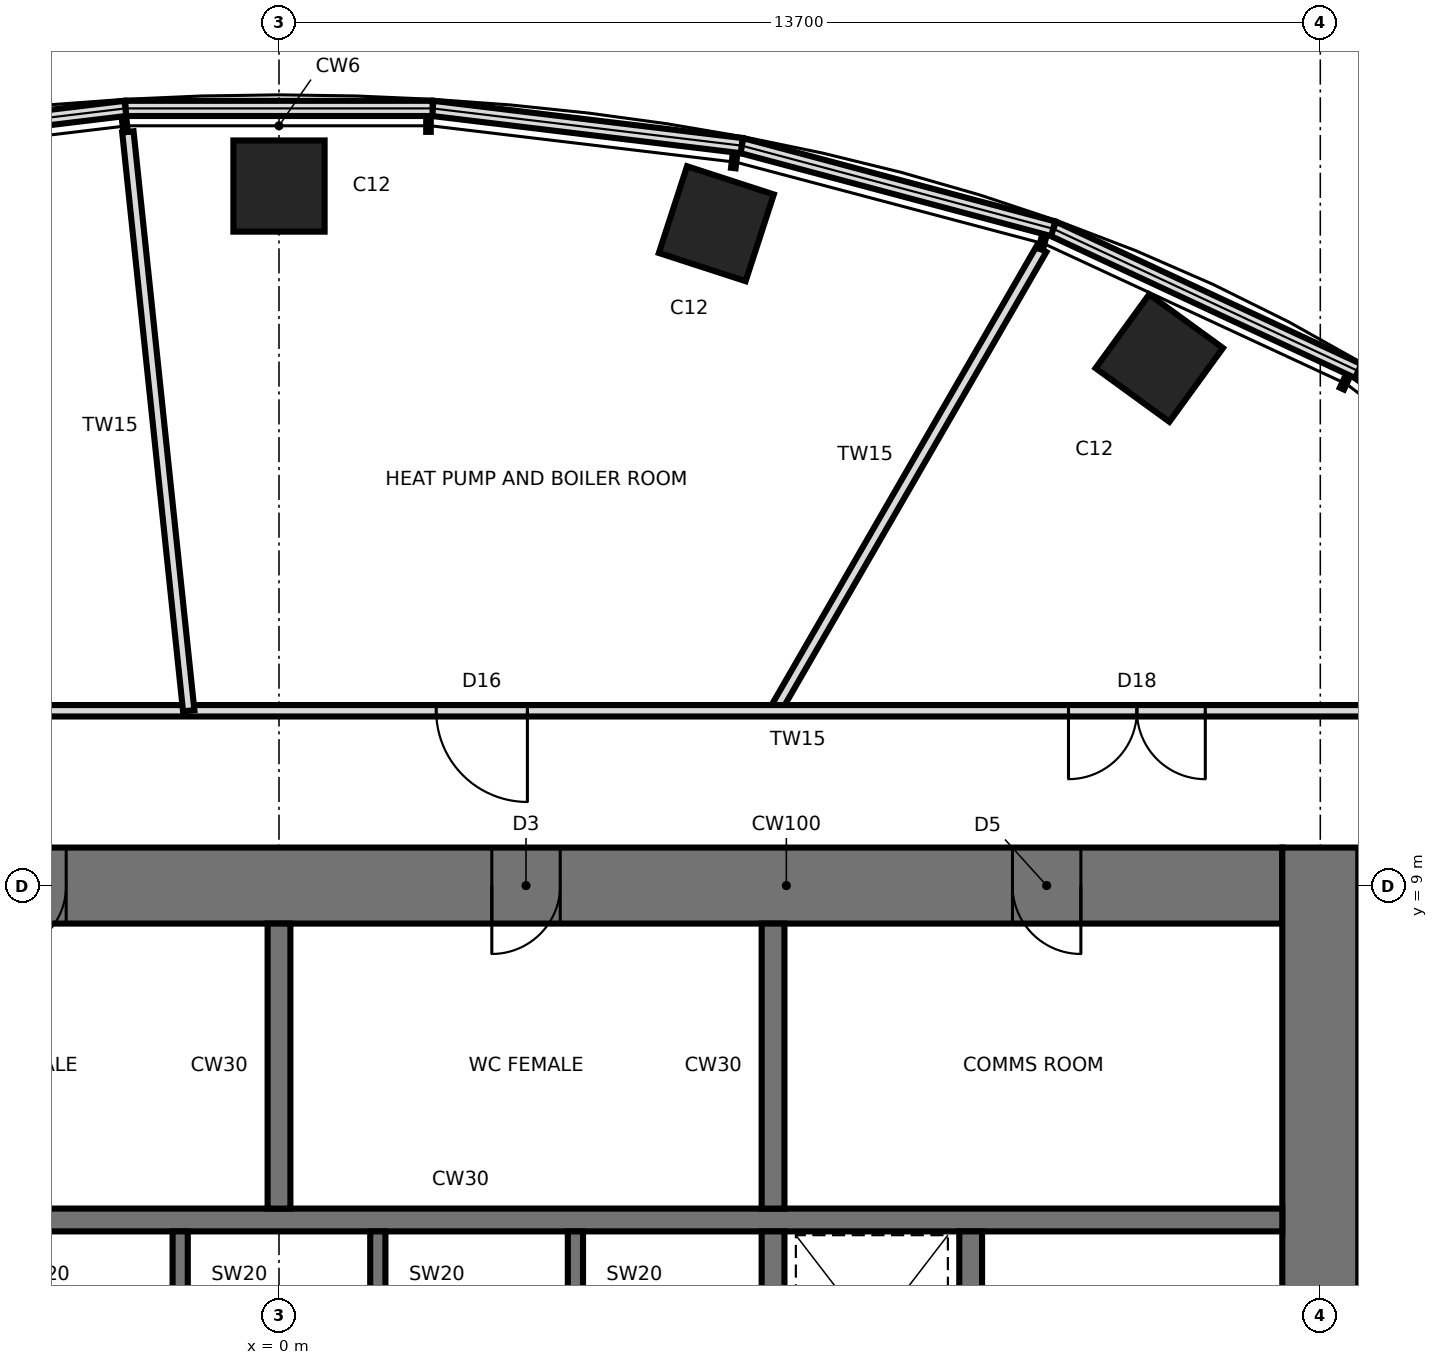
"""IFC4 building model, lengths in metres.
Left out: names, types, materials, properties, quantities, classifications, styles, units other than length and angle.
Written with IfcOpenShell. Run it as: python <this file> out.ifc"""

import sys

from ifc_helpers import new_model, si_unit, direction, frame, frame_2d, origin, origin_2d, place, context, subcontext, project, spatial, rectangle, extrude, element, fill, save


model = new_model("IFC4")
c1 = context("Model", 3, precision=1e-05, world=origin(), true_north=direction((0.0, 1.0)))
c2 = subcontext(c1, "Body", "Model", "MODEL_VIEW")
j1 = project(units=[si_unit("LENGTHUNIT", "METRE"), si_unit("PLANEANGLEUNIT", "RADIAN")], contexts=[c1])
p1 = place(None, origin())
s1 = spatial("IfcSite", under=j1, at=p1, CompositionType="ELEMENT")
p2 = place(p1, origin())
s2 = spatial("IfcBuilding", under=s1, at=p2, CompositionType="ELEMENT")
p3 = place(p2, frame((0.0, 0.0, 277.0)))
s3 = spatial("IfcBuildingStorey", under=s2, at=p3, CompositionType="ELEMENT", Elevation=277.0)
for number, where, z_axis, x_axis in (
    (1, (11.581, 15.94, 0.0), (0.0, 0.0, 1.0), (0.588, 0.809, 0.0)),
    (2, (5.754, 17.708, 0.0), (0.0, 0.0, 1.0), (0.309, 0.951, 0.0)),
    (3, (0.0, 18.204, 0.0), (0.0, 0.0, 1.0), (0.0, 1.0, 0.0)),
):
    element("IfcColumn", number, at=place(p3, frame(where, z_axis=z_axis, x_axis=x_axis)), inside=s3, PredefinedType="COLUMN", context=c2, shape_type="SweptSolid", body=[
        extrude(rectangle(XDim=1.2, YDim=1.2, at=origin_2d()), origin(), (0.0, 0.0, 1.0), 5.0),
    ])
p4 = place(p3, frame((13.2, 9.0, 0.0), z_axis=(0.0, 0.0, 1.0), x_axis=(-1.0, 0.0, 0.0)))
e4 = element("IfcWall", 4, at=p4, inside=s3, PredefinedType="SHEAR", context=c2, shape_type="SweptSolid", body=[
    extrude(rectangle(XDim=26.4, YDim=1.0, at=frame_2d((13.2, 0.0))), origin(), (0.0, 0.0, 1.0), 5.0),
])
p5 = place(p4, frame((2.65, 0.0, 0.0)))
e5 = element("IfcOpeningElement", 5, at=p5, cuts=e4, PredefinedType="OPENING", context=c2, shape_type="SweptSolid", body=[
    extrude(rectangle(XDim=0.9, YDim=2.1, at=frame_2d((0.45, 1.05))), frame((0.0, 0.51, 0.0), z_axis=(0.0, -1.0, 0.0), x_axis=(1.0, 0.0, 0.0)), (0.0, 0.0, 1.0), 1.02),
])
p6 = place(p4, frame((9.5, 0.0, 0.0)))
e6 = element("IfcOpeningElement", 6, at=p6, cuts=e4, PredefinedType="OPENING", context=c2, shape_type="SweptSolid", body=[
    extrude(rectangle(XDim=0.9, YDim=2.1, at=frame_2d((0.45, 1.05))), frame((0.0, 0.51, 0.0), z_axis=(0.0, -1.0, 0.0), x_axis=(1.0, 0.0, 0.0)), (0.0, 0.0, 1.0), 1.02),
])
p7 = place(p4, frame((16.0, 0.0, 0.0)))
e7 = element("IfcOpeningElement", 7, at=p7, cuts=e4, PredefinedType="OPENING", context=c2, shape_type="SweptSolid", body=[
    extrude(rectangle(XDim=0.9, YDim=2.1, at=frame_2d((0.45, 1.05))), frame((0.0, 0.51, 0.0), z_axis=(0.0, -1.0, 0.0), x_axis=(1.0, 0.0, 0.0)), (0.0, 0.0, 1.0), 1.02),
])
p8 = place(p4, frame((21.25, 0.0, 0.0)))
e8 = element("IfcOpeningElement", 8, at=p8, cuts=e4, PredefinedType="OPENING", context=c2, shape_type="SweptSolid", body=[
    extrude(rectangle(XDim=0.9, YDim=2.1, at=frame_2d((0.45, 1.05))), frame((0.0, 0.51, 0.0), z_axis=(0.0, -1.0, 0.0), x_axis=(1.0, 0.0, 0.0)), (0.0, 0.0, 1.0), 1.02),
])
p9 = place(p4, frame((24.8, 0.0, 0.0)))
e9 = element("IfcOpeningElement", 9, at=p9, cuts=e4, PredefinedType="OPENING", context=c2, shape_type="SweptSolid", body=[
    extrude(rectangle(XDim=1.0, YDim=2.1, at=frame_2d((0.5, 1.05))), frame((0.0, 0.51, 0.0), z_axis=(0.0, -1.0, 0.0), x_axis=(1.0, 0.0, 0.0)), (0.0, 0.0, 1.0), 1.02),
])
p10 = place(p3, frame((13.7, -9.5, 0.0), z_axis=(0.0, 0.0, 1.0), x_axis=(0.0, 1.0, 0.0)))
e10 = element("IfcWall", 10, at=p10, inside=s3, PredefinedType="SHEAR", context=c2, shape_type="SweptSolid", body=[
    extrude(rectangle(XDim=19.0, YDim=1.0, at=frame_2d((9.5, 0.0))), origin(), (0.0, 0.0, 1.0), 5.0),
])
p11 = place(p10, frame((8.6, 0.0, 0.0)))
e11 = element("IfcOpeningElement", 11, at=p11, cuts=e10, PredefinedType="OPENING", context=c2, shape_type="SweptSolid", body=[
    extrude(rectangle(XDim=1.8, YDim=2.4, at=frame_2d((0.9, 1.2))), frame((0.0, 0.51, 0.0), z_axis=(0.0, -1.0, 0.0), x_axis=(1.0, 0.0, 0.0)), (0.0, 0.0, 1.0), 1.02),
])
p12 = place(p3, frame((-13.2, 4.6, 0.0), z_axis=(0.0, 0.0, 1.0), x_axis=(1.0, 0.0, 0.0)))
e12 = element("IfcWall", 12, at=p12, inside=s3, PredefinedType="SHEAR", context=c2, shape_type="SweptSolid", body=[
    extrude(rectangle(XDim=26.4, YDim=0.3, at=frame_2d((13.2, 0.0))), origin(), (0.0, 0.0, 1.0), 5.0),
])
p13 = place(p3, frame((6.5, 1.75, 0.0), z_axis=(0.0, 0.0, 1.0), x_axis=(0.0, 1.0, 0.0)))
e13 = element("IfcWall", 13, at=p13, inside=s3, PredefinedType="SHEAR", context=c2, shape_type="SweptSolid", body=[
    extrude(rectangle(XDim=2.7, YDim=0.3, at=frame_2d((1.35, 0.0))), origin(), (0.0, 0.0, 1.0), 5.0),
])
p14 = place(p3, frame((6.5, 4.75, 0.0), z_axis=(0.0, 0.0, 1.0), x_axis=(0.0, 1.0, 0.0)))
e14 = element("IfcWall", 14, at=p14, inside=s3, PredefinedType="SHEAR", context=c2, shape_type="SweptSolid", body=[
    extrude(rectangle(XDim=3.75, YDim=0.3, at=frame_2d((1.875, 0.0))), origin(), (0.0, 0.0, 1.0), 5.0),
])
for number, where, z_axis, x_axis in (
    (15, (-1.3, 1.75, 0.0), (0.0, 0.0, 1.0), (0.0, 1.0, 0.0)),
    (16, (1.3, 1.75, 0.0), (0.0, 0.0, 1.0), (0.0, 1.0, 0.0)),
    (17, (3.9, 1.75, 0.0), (0.0, 0.0, 1.0), (0.0, 1.0, 0.0)),
):
    element("IfcWall", number, at=place(p3, frame(where, z_axis=z_axis, x_axis=x_axis)), inside=s3, PredefinedType="SHEAR", context=c2, shape_type="SweptSolid", body=[
        extrude(rectangle(XDim=2.7, YDim=0.2, at=frame_2d((1.35, 0.0))), origin(), (0.0, 0.0, 1.0), 5.0),
    ])
p15 = place(p3, frame((0.0, 4.75, 0.0), z_axis=(0.0, 0.0, 1.0), x_axis=(0.0, 1.0, 0.0)))
e18 = element("IfcWall", 18, at=p15, inside=s3, PredefinedType="SHEAR", context=c2, shape_type="SweptSolid", body=[
    extrude(rectangle(XDim=3.75, YDim=0.3, at=frame_2d((1.875, 0.0))), origin(), (0.0, 0.0, 1.0), 5.0),
])
p16 = place(p3, frame((9.1, 1.75, 0.0), z_axis=(0.0, 0.0, 1.0), x_axis=(0.0, 1.0, 0.0)))
e19 = element("IfcWall", 19, at=p16, inside=s3, PredefinedType="SHEAR", context=c2, shape_type="SweptSolid", body=[
    extrude(rectangle(XDim=2.7, YDim=0.3, at=frame_2d((1.35, 0.0))), origin(), (0.0, 0.0, 1.0), 5.0),
])
p17 = place(p3, frame((17.859, 12.976, 5.0), z_axis=(0.0, 0.0, 1.0), x_axis=(-0.794855686591, 0.606798514743, 0.0)))
e20 = element("IfcWall", 20, at=p17, inside=s3, PredefinedType="PARAPET", context=c2, shape_type="SweptSolid", body=[
    extrude(rectangle(XDim=4.605, YDim=0.2, at=frame_2d((2.302, 0.0))), origin(), (0.0, 0.0, 1.0), 0.4),
])
p18 = place(p3, frame((14.199, 15.77, 5.0), z_axis=(0.0, 0.0, 1.0), x_axis=(-0.906246502857, 0.422749661217, 0.0)))
e21 = element("IfcWall", 21, at=p18, inside=s3, PredefinedType="PARAPET", context=c2, shape_type="SweptSolid", body=[
    extrude(rectangle(XDim=4.429, YDim=0.2, at=frame_2d((2.214, 0.0))), origin(), (0.0, 0.0, 1.0), 0.4),
])
p19 = place(p3, frame((10.186, 17.642, 5.0), z_axis=(0.0, 0.0, 1.0), x_axis=(-0.96617759257, 0.257877605881, 0.0)))
e22 = element("IfcWall", 22, at=p19, inside=s3, PredefinedType="PARAPET", context=c2, shape_type="SweptSolid", body=[
    extrude(rectangle(XDim=4.241, YDim=0.2, at=frame_2d((2.121, 0.0))), origin(), (0.0, 0.0, 1.0), 0.4),
])
p20 = place(p3, frame((6.088, 18.736, 5.0), z_axis=(0.0, 0.0, 1.0), x_axis=(-0.99282711648, 0.119558842338, 0.0)))
e23 = element("IfcWall", 23, at=p20, inside=s3, PredefinedType="PARAPET", context=c2, shape_type="SweptSolid", body=[
    extrude(rectangle(XDim=4.096, YDim=0.2, at=frame_2d((2.048, 0.0))), origin(), (0.0, 0.0, 1.0), 0.4),
])
p21 = place(p3, frame((2.021, 19.226, 5.0), z_axis=(0.0, 0.0, 1.0), x_axis=(-1.0, 0.0, 0.0)))
e24 = element("IfcWall", 24, at=p21, inside=s3, PredefinedType="PARAPET", context=c2, shape_type="SweptSolid", body=[
    extrude(rectangle(XDim=4.042, YDim=0.2, at=frame_2d((2.021, 0.0))), origin(), (0.0, 0.0, 1.0), 0.4),
])
p22 = place(p3, frame((-2.021, 19.226, 5.0), z_axis=(0.0, 0.0, 1.0), x_axis=(-0.99282711648, -0.119558842338, 0.0)))
e25 = element("IfcWall", 25, at=p22, inside=s3, PredefinedType="PARAPET", context=c2, shape_type="SweptSolid", body=[
    extrude(rectangle(XDim=4.096, YDim=0.2, at=frame_2d((2.048, 0.0))), origin(), (0.0, 0.0, 1.0), 0.4),
])
p23 = place(p3, frame((6.524, 11.3, 0.0), z_axis=(0.0, 0.0, 1.0), x_axis=(0.4999806097, 0.86603659849, 0.0)))
e26 = element("IfcWall", 26, at=p23, inside=s3, PredefinedType="PARTITIONING", context=c2, shape_type="SweptSolid", body=[
    extrude(rectangle(XDim=7.013, YDim=0.15, at=frame_2d((3.506, 0.0))), origin(), (0.0, 0.0, 1.0), 4.75),
])
p24 = place(p3, frame((16.0, 11.3, 0.0), z_axis=(0.0, 0.0, 1.0), x_axis=(-1.0, 0.0, 0.0)))
e27 = element("IfcWall", 27, at=p24, inside=s3, PredefinedType="PARTITIONING", context=c2, shape_type="SweptSolid", body=[
    extrude(rectangle(XDim=32.0, YDim=0.15, at=frame_2d((16.0, 0.0))), origin(), (0.0, 0.0, 1.0), 4.75),
])
p25 = place(p24, frame((3.813, 0.0, 0.0)))
e28 = element("IfcOpeningElement", 28, at=p25, cuts=e27, PredefinedType="OPENING", context=c2, shape_type="SweptSolid", body=[
    extrude(rectangle(XDim=1.8, YDim=2.4, at=frame_2d((0.9, 1.2))), frame((0.0, 0.085, 0.0), z_axis=(0.0, -1.0, 0.0), x_axis=(1.0, 0.0, 0.0)), (0.0, 0.0, 1.0), 0.17),
])
p26 = place(p24, frame((12.732, 0.0, 0.0)))
e29 = element("IfcOpeningElement", 29, at=p26, cuts=e27, PredefinedType="OPENING", context=c2, shape_type="SweptSolid", body=[
    extrude(rectangle(XDim=1.2, YDim=2.1, at=frame_2d((0.6, 1.05))), frame((0.0, 0.085, 0.0), z_axis=(0.0, -1.0, 0.0), x_axis=(1.0, 0.0, 0.0)), (0.0, 0.0, 1.0), 0.17),
])
p27 = place(p24, frame((20.806, 0.0, 0.0)))
e30 = element("IfcOpeningElement", 30, at=p27, cuts=e27, PredefinedType="OPENING", context=c2, shape_type="SweptSolid", body=[
    extrude(rectangle(XDim=1.8, YDim=2.4, at=frame_2d((0.9, 1.2))), frame((0.0, 0.085, 0.0), z_axis=(0.0, -1.0, 0.0), x_axis=(1.0, 0.0, 0.0)), (0.0, 0.0, 1.0), 0.17),
])
p28 = place(p24, frame((28.487, 0.0, 0.0)))
e31 = element("IfcOpeningElement", 31, at=p28, cuts=e27, PredefinedType="OPENING", context=c2, shape_type="SweptSolid", body=[
    extrude(rectangle(XDim=1.2, YDim=2.1, at=frame_2d((0.6, 1.05))), frame((0.0, 0.085, 0.0), z_axis=(0.0, -1.0, 0.0), x_axis=(1.0, 0.0, 0.0)), (0.0, 0.0, 1.0), 0.17),
])
p29 = place(p3, frame((-1.188, 11.3, 0.0), z_axis=(0.0, 0.0, 1.0), x_axis=(-0.10451720061, 0.994523079057, 0.0)))
e32 = element("IfcWall", 32, at=p29, inside=s3, PredefinedType="PARTITIONING", context=c2, shape_type="SweptSolid", body=[
    extrude(rectangle(XDim=7.659, YDim=0.15, at=frame_2d((3.83, 0.0))), origin(), (0.0, 0.0, 1.0), 4.75),
])
p30 = place(p5, origin())
e33 = element("IfcDoor", 33, at=p30, inside=s3, OperationType="SINGLE_SWING_LEFT", PredefinedType="DOOR", context=c2, shape_type="SweptSolid", body=[
    extrude(rectangle(XDim=0.82, YDim=2.06, at=frame_2d((0.45, 1.03))), frame((0.0, 0.025, 0.0), z_axis=(0.0, -1.0, 0.0), x_axis=(1.0, 0.0, 0.0)), (0.0, 0.0, 1.0), 0.05),
    extrude(rectangle(XDim=0.04, YDim=2.1, at=frame_2d((0.02, 1.05))), frame((0.0, 0.25, 0.0), z_axis=(0.0, -1.0, 0.0), x_axis=(1.0, 0.0, 0.0)), (0.0, 0.0, 1.0), 0.5),
    extrude(rectangle(XDim=0.04, YDim=2.1, at=frame_2d((0.88, 1.05))), frame((0.0, 0.25, 0.0), z_axis=(0.0, -1.0, 0.0), x_axis=(1.0, 0.0, 0.0)), (0.0, 0.0, 1.0), 0.5),
    extrude(rectangle(XDim=0.82, YDim=0.04, at=frame_2d((0.45, 2.08))), frame((0.0, 0.25, 0.0), z_axis=(0.0, -1.0, 0.0), x_axis=(1.0, 0.0, 0.0)), (0.0, 0.0, 1.0), 0.5),
])
fill(e5, e33)
p31 = place(p6, origin())
e34 = element("IfcDoor", 34, at=p31, inside=s3, OperationType="SINGLE_SWING_RIGHT", PredefinedType="DOOR", context=c2, shape_type="SweptSolid", body=[
    extrude(rectangle(XDim=0.82, YDim=2.06, at=frame_2d((0.45, 1.03))), frame((0.0, 0.025, 0.0), z_axis=(0.0, -1.0, 0.0), x_axis=(1.0, 0.0, 0.0)), (0.0, 0.0, 1.0), 0.05),
    extrude(rectangle(XDim=0.04, YDim=2.1, at=frame_2d((0.02, 1.05))), frame((0.0, 0.25, 0.0), z_axis=(0.0, -1.0, 0.0), x_axis=(1.0, 0.0, 0.0)), (0.0, 0.0, 1.0), 0.5),
    extrude(rectangle(XDim=0.04, YDim=2.1, at=frame_2d((0.88, 1.05))), frame((0.0, 0.25, 0.0), z_axis=(0.0, -1.0, 0.0), x_axis=(1.0, 0.0, 0.0)), (0.0, 0.0, 1.0), 0.5),
    extrude(rectangle(XDim=0.82, YDim=0.04, at=frame_2d((0.45, 2.08))), frame((0.0, 0.25, 0.0), z_axis=(0.0, -1.0, 0.0), x_axis=(1.0, 0.0, 0.0)), (0.0, 0.0, 1.0), 0.5),
])
fill(e6, e34)
p32 = place(p7, origin())
e35 = element("IfcDoor", 35, at=p32, inside=s3, OperationType="SINGLE_SWING_RIGHT", PredefinedType="DOOR", context=c2, shape_type="SweptSolid", body=[
    extrude(rectangle(XDim=0.82, YDim=2.06, at=frame_2d((0.45, 1.03))), frame((0.0, 0.025, 0.0), z_axis=(0.0, -1.0, 0.0), x_axis=(1.0, 0.0, 0.0)), (0.0, 0.0, 1.0), 0.05),
    extrude(rectangle(XDim=0.04, YDim=2.1, at=frame_2d((0.02, 1.05))), frame((0.0, 0.25, 0.0), z_axis=(0.0, -1.0, 0.0), x_axis=(1.0, 0.0, 0.0)), (0.0, 0.0, 1.0), 0.5),
    extrude(rectangle(XDim=0.04, YDim=2.1, at=frame_2d((0.88, 1.05))), frame((0.0, 0.25, 0.0), z_axis=(0.0, -1.0, 0.0), x_axis=(1.0, 0.0, 0.0)), (0.0, 0.0, 1.0), 0.5),
    extrude(rectangle(XDim=0.82, YDim=0.04, at=frame_2d((0.45, 2.08))), frame((0.0, 0.25, 0.0), z_axis=(0.0, -1.0, 0.0), x_axis=(1.0, 0.0, 0.0)), (0.0, 0.0, 1.0), 0.5),
])
fill(e7, e35)
p33 = place(p25, origin())
e36 = element("IfcDoor", 36, at=p33, inside=s3, OperationType="DOUBLE_DOOR_SINGLE_SWING", PredefinedType="DOOR", context=c2, shape_type="SweptSolid", body=[
    extrude(rectangle(XDim=1.8, YDim=2.4, at=frame_2d((0.9, 1.2))), frame((0.0, 0.025, 0.0), z_axis=(0.0, -1.0, 0.0), x_axis=(1.0, 0.0, 0.0)), (0.0, 0.0, 1.0), 0.05),
])
fill(e28, e36)
p34 = place(p26, origin())
e37 = element("IfcDoor", 37, at=p34, inside=s3, OperationType="SINGLE_SWING_LEFT", PredefinedType="DOOR", context=c2, shape_type="SweptSolid", body=[
    extrude(rectangle(XDim=1.2, YDim=2.1, at=frame_2d((0.6, 1.05))), frame((0.0, 0.025, 0.0), z_axis=(0.0, -1.0, 0.0), x_axis=(1.0, 0.0, 0.0)), (0.0, 0.0, 1.0), 0.05),
])
fill(e29, e37)
save(model, sys.argv[1])
